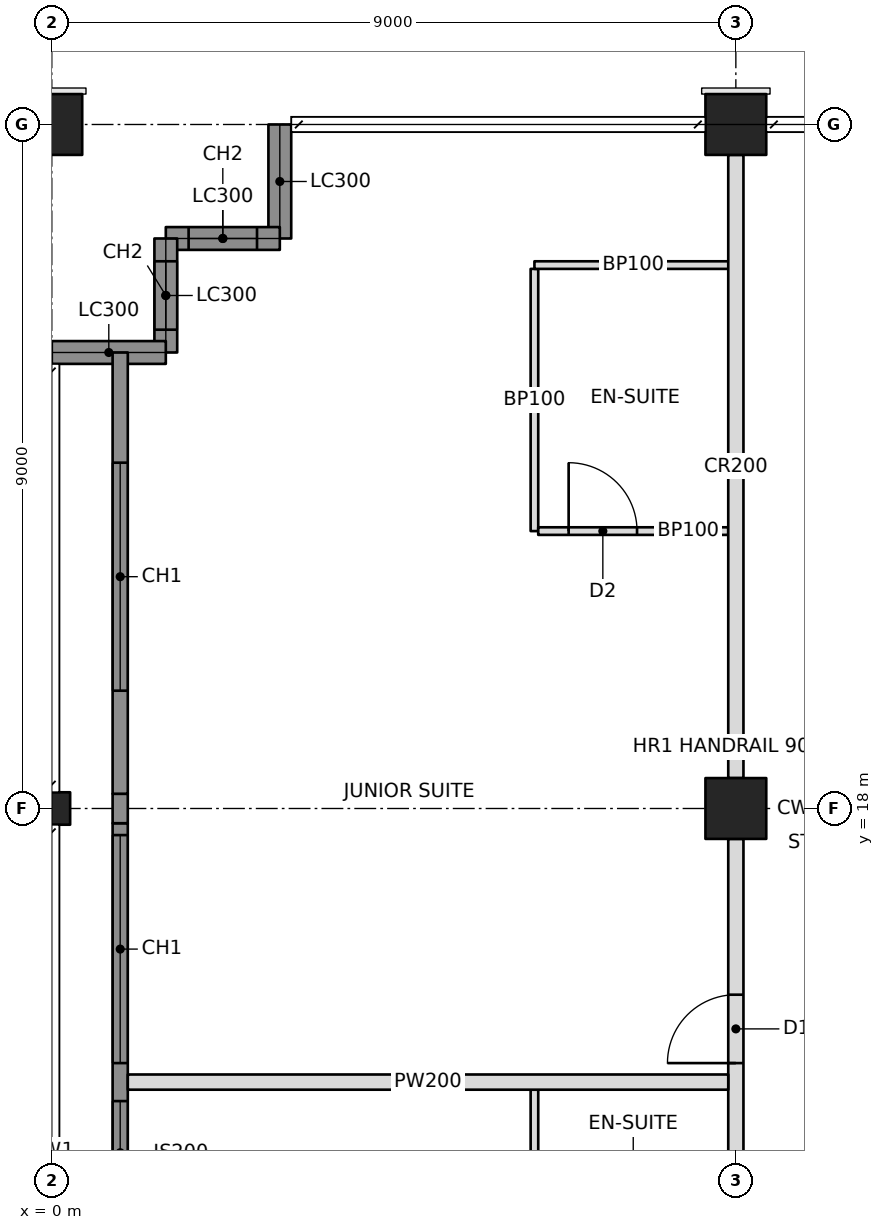
"""IFC4 building model, lengths in metres.
Left out: names, types, materials, properties, quantities, classifications, styles, units other than length and angle.
Written with IfcOpenShell. Run it as: python <this file> out.ifc"""

import sys

from ifc_helpers import new_model, si_unit, direction, frame, frame_2d, origin, origin_2d, place, context, subcontext, project, spatial, rectangle, hollow_rectangle, i_section, extrude, element, fill, save


model = new_model("IFC4")
c1 = context("Model", 3, precision=1e-05, world=origin(), true_north=direction((0.0, 1.0)))
c2 = subcontext(c1, "Body", "Model", "MODEL_VIEW")
j1 = project(units=[si_unit("LENGTHUNIT", "METRE"), si_unit("PLANEANGLEUNIT", "RADIAN")], contexts=[c1])
p1 = place(None, origin())
s1 = spatial("IfcSite", under=j1, at=p1, CompositionType="ELEMENT")
p2 = place(p1, origin())
s2 = spatial("IfcBuilding", under=s1, at=p2, CompositionType="ELEMENT")
p3 = place(p2, frame((0.0, 0.0, 208.0)))
s3 = spatial("IfcBuildingStorey", under=s2, at=p3, CompositionType="ELEMENT", Elevation=208.0)
p4 = place(p3, frame((0.0, 18.0, 0.0), z_axis=(0.0, 0.0, 1.0), x_axis=(0.0, 1.0, 0.0)))
e1 = element("IfcColumn", 1, at=p4, inside=s3, PredefinedType="COLUMN", context=c2, shape_type="SweptSolid", body=[
    extrude(i_section(OverallWidth=0.427, OverallDepth=0.483, WebThickness=0.051, FlangeThickness=0.082, at=origin_2d()), origin(), (0.0, 0.0, 1.0), 3.4),
])
p5 = place(p3, frame((0.0, 27.0, 0.0), z_axis=(0.0, 0.0, 1.0), x_axis=(0.0, 1.0, 0.0)))
e2 = element("IfcColumn", 2, at=p5, inside=s3, PredefinedType="COLUMN", context=c2, shape_type="SweptSolid", body=[
    extrude(hollow_rectangle(XDim=0.8, YDim=0.8, WallThickness=0.06, at=origin_2d()), origin(), (0.0, 0.0, 1.0), 3.4),
])
p6 = place(p3, frame((9.0, 18.0, 0.0), z_axis=(0.0, 0.0, 1.0), x_axis=(1.0, 0.0, 0.0)))
e3 = element("IfcColumn", 3, at=p6, inside=s3, PredefinedType="COLUMN", context=c2, shape_type="SweptSolid", body=[
    extrude(hollow_rectangle(XDim=0.8, YDim=0.8, WallThickness=0.05, at=origin_2d()), origin(), (0.0, 0.0, 1.0), 3.4),
])
p7 = place(p3, frame((9.0, 27.0, 0.0), z_axis=(0.0, 0.0, 1.0), x_axis=(1.0, 0.0, 0.0)))
e4 = element("IfcColumn", 4, at=p7, inside=s3, PredefinedType="COLUMN", context=c2, shape_type="SweptSolid", body=[
    extrude(hollow_rectangle(XDim=0.8, YDim=0.8, WallThickness=0.06, at=origin_2d()), origin(), (0.0, 0.0, 1.0), 3.4),
])
p8 = place(p3, frame((3.0, 27.0, 0.0), z_axis=(0.0, 0.0, 1.0), x_axis=(0.0, -1.0, 0.0)))
e5 = element("IfcWall", 5, at=p8, inside=s3, PredefinedType="SOLIDWALL", context=c2, shape_type="SweptSolid", body=[
    extrude(rectangle(XDim=1.5, YDim=0.3, at=frame_2d((0.75, 0.0))), origin(), (0.0, 0.0, 1.0), 2.42),
])
p9 = place(p3, frame((3.0, 25.5, 0.0), z_axis=(0.0, 0.0, 1.0), x_axis=(-1.0, 0.0, 0.0)))
e6 = element("IfcWall", 6, at=p9, inside=s3, PredefinedType="SOLIDWALL", context=c2, shape_type="SweptSolid", body=[
    extrude(rectangle(XDim=1.5, YDim=0.3, at=frame_2d((0.75, 0.0))), origin(), (0.0, 0.0, 1.0), 3.2),
])
p10 = place(p9, frame((0.3, 0.0, 0.6)))
e7 = element("IfcOpeningElement", 7, at=p10, cuts=e6, PredefinedType="OPENING", context=c2, shape_type="SweptSolid", body=[
    extrude(rectangle(XDim=0.9, YDim=2.2, at=frame_2d((0.45, 1.1))), frame((0.0, 0.16, 0.0), z_axis=(0.0, -1.0, 0.0), x_axis=(1.0, 0.0, 0.0)), (0.0, 0.0, 1.0), 0.32),
])
p11 = place(p3, frame((1.5, 25.5, 0.0), z_axis=(0.0, 0.0, 1.0), x_axis=(0.0, -1.0, 0.0)))
e8 = element("IfcWall", 8, at=p11, inside=s3, PredefinedType="SOLIDWALL", context=c2, shape_type="SweptSolid", body=[
    extrude(rectangle(XDim=1.5, YDim=0.3, at=frame_2d((0.75, 0.0))), origin(), (0.0, 0.0, 1.0), 3.2),
])
p12 = place(p11, frame((0.3, 0.0, 0.6)))
e9 = element("IfcOpeningElement", 9, at=p12, cuts=e8, PredefinedType="OPENING", context=c2, shape_type="SweptSolid", body=[
    extrude(rectangle(XDim=0.9, YDim=2.2, at=frame_2d((0.45, 1.1))), frame((0.0, 0.16, 0.0), z_axis=(0.0, -1.0, 0.0), x_axis=(1.0, 0.0, 0.0)), (0.0, 0.0, 1.0), 0.32),
])
p13 = place(p3, frame((1.5, 24.0, 0.0), z_axis=(0.0, 0.0, 1.0), x_axis=(-1.0, 0.0, 0.0)))
e10 = element("IfcWall", 10, at=p13, inside=s3, PredefinedType="SOLIDWALL", context=c2, shape_type="SweptSolid", body=[
    extrude(rectangle(XDim=1.5, YDim=0.3, at=frame_2d((0.75, 0.0))), origin(), (0.0, 0.0, 1.0), 2.42),
])
p14 = place(p3, frame((9.0, 10.8, 0.0), z_axis=(0.0, 0.0, 1.0), x_axis=(0.0, 1.0, 0.0)))
e11 = element("IfcWall", 11, at=p14, inside=s3, PredefinedType="PARTITIONING", context=c2, shape_type="SweptSolid", body=[
    extrude(rectangle(XDim=6.8, YDim=0.2, at=frame_2d((3.4, 0.0))), origin(), (0.0, 0.0, 1.0), 2.405),
])
p15 = place(p14, frame((0.25, 0.0, 0.0)))
e12 = element("IfcOpeningElement", 12, at=p15, cuts=e11, PredefinedType="OPENING", context=c2, shape_type="SweptSolid", body=[
    extrude(rectangle(XDim=0.9, YDim=2.1, at=frame_2d((0.45, 1.05))), frame((0.0, 0.11, 0.0), z_axis=(0.0, -1.0, 0.0), x_axis=(1.0, 0.0, 0.0)), (0.0, 0.0, 1.0), 0.22),
])
p16 = place(p14, frame((3.85, 0.0, 0.0)))
e13 = element("IfcOpeningElement", 13, at=p16, cuts=e11, PredefinedType="OPENING", context=c2, shape_type="SweptSolid", body=[
    extrude(rectangle(XDim=0.9, YDim=2.1, at=frame_2d((0.45, 1.05))), frame((0.0, 0.11, 0.0), z_axis=(0.0, -1.0, 0.0), x_axis=(1.0, 0.0, 0.0)), (0.0, 0.0, 1.0), 0.22),
])
p17 = place(p3, frame((9.0, 18.4, 0.0), z_axis=(0.0, 0.0, 1.0), x_axis=(0.0, 1.0, 0.0)))
e14 = element("IfcWall", 14, at=p17, inside=s3, PredefinedType="PARTITIONING", context=c2, shape_type="SweptSolid", body=[
    extrude(rectangle(XDim=8.2, YDim=0.2, at=frame_2d((4.1, 0.0))), origin(), (0.0, 0.0, 1.0), 2.405),
])
p18 = place(p3, frame((8.9, 14.4, 0.0), z_axis=(0.0, 0.0, 1.0), x_axis=(-1.0, 0.0, 0.0)))
e15 = element("IfcWall", 15, at=p18, inside=s3, PredefinedType="PARTITIONING", context=c2, shape_type="SweptSolid", body=[
    extrude(rectangle(XDim=7.9, YDim=0.2, at=frame_2d((3.95, 0.0))), origin(), (0.0, 0.0, 1.0), 2.404),
])
p19 = place(p3, frame((6.35, 12.25, 0.0), z_axis=(0.0, 0.0, 1.0), x_axis=(0.0, 1.0, 0.0)))
e16 = element("IfcWall", 16, at=p19, inside=s3, PredefinedType="PARTITIONING", context=c2, shape_type="SweptSolid", body=[
    extrude(rectangle(XDim=2.05, YDim=0.1, at=frame_2d((1.025, 0.0))), origin(), (0.0, 0.0, 1.0), 3.2),
])
p20 = place(p3, frame((6.35, 21.65, 0.0), z_axis=(0.0, 0.0, 1.0), x_axis=(0.0, 1.0, 0.0)))
e17 = element("IfcWall", 17, at=p20, inside=s3, PredefinedType="PARTITIONING", context=c2, shape_type="SweptSolid", body=[
    extrude(rectangle(XDim=3.45, YDim=0.1, at=frame_2d((1.725, 0.0))), origin(), (0.0, 0.0, 1.0), 3.2),
])
p21 = place(p3, frame((8.9, 21.65, 0.0), z_axis=(0.0, 0.0, 1.0), x_axis=(-1.0, 0.0, 0.0)))
e18 = element("IfcWall", 18, at=p21, inside=s3, PredefinedType="PARTITIONING", context=c2, shape_type="SweptSolid", body=[
    extrude(rectangle(XDim=2.5, YDim=0.1, at=frame_2d((1.25, 0.0))), origin(), (0.0, 0.0, 1.0), 2.404),
])
p22 = place(p21, frame((1.2, 0.0, 0.0)))
e19 = element("IfcOpeningElement", 19, at=p22, cuts=e18, PredefinedType="OPENING", context=c2, shape_type="SweptSolid", body=[
    extrude(rectangle(XDim=0.9, YDim=2.1, at=frame_2d((0.45, 1.05))), frame((0.0, 0.06, 0.0), z_axis=(0.0, -1.0, 0.0), x_axis=(1.0, 0.0, 0.0)), (0.0, 0.0, 1.0), 0.12),
])
p23 = place(p3, frame((6.35, 25.15, 0.0), z_axis=(0.0, 0.0, 1.0), x_axis=(1.0, 0.0, 0.0)))
e20 = element("IfcWall", 20, at=p23, inside=s3, PredefinedType="PARTITIONING", context=c2, shape_type="SweptSolid", body=[
    extrude(rectangle(XDim=2.6, YDim=0.1, at=frame_2d((1.3, 0.0))), origin(), (0.0, 0.0, 1.0), 2.404),
])
p24 = place(p3, frame((0.9, 9.135, 0.0), z_axis=(0.0, 0.0, 1.0), x_axis=(0.0, 1.0, 0.0)))
e21 = element("IfcWall", 21, at=p24, inside=s3, PredefinedType="SOLIDWALL", context=c2, shape_type="SweptSolid", body=[
    extrude(rectangle(XDim=8.671, YDim=0.2, at=frame_2d((4.335, 0.0))), origin(), (0.0, 0.0, 1.0), 3.2),
])
p25 = place(p24, frame((2.015, 0.0, 0.6)))
e22 = element("IfcOpeningElement", 22, at=p25, cuts=e21, PredefinedType="OPENING", context=c2, shape_type="SweptSolid", body=[
    extrude(rectangle(XDim=3.0, YDim=2.2, at=frame_2d((1.5, 1.1))), frame((0.0, 0.11, 0.0), z_axis=(0.0, -1.0, 0.0), x_axis=(1.0, 0.0, 0.0)), (0.0, 0.0, 1.0), 0.22),
])
p26 = place(p24, frame((5.515, 0.0, 0.6)))
e23 = element("IfcOpeningElement", 23, at=p26, cuts=e21, PredefinedType="OPENING", context=c2, shape_type="SweptSolid", body=[
    extrude(rectangle(XDim=3.0, YDim=2.2, at=frame_2d((1.5, 1.1))), frame((0.0, 0.11, 0.0), z_axis=(0.0, -1.0, 0.0), x_axis=(1.0, 0.0, 0.0)), (0.0, 0.0, 1.0), 0.22),
])
p27 = place(p3, frame((0.9, 17.806, 0.0), z_axis=(0.0, 0.0, 1.0), x_axis=(0.0, 1.0, 0.0)))
e24 = element("IfcWall", 24, at=p27, inside=s3, PredefinedType="SOLIDWALL", context=c2, shape_type="SweptSolid", body=[
    extrude(rectangle(XDim=0.388, YDim=0.2, at=frame_2d((0.194, 0.0))), origin(), (0.0, 0.0, 1.0), 2.404),
])
p28 = place(p3, frame((0.9, 18.194, 0.0), z_axis=(0.0, 0.0, 1.0), x_axis=(0.0, 1.0, 0.0)))
e25 = element("IfcWall", 25, at=p28, inside=s3, PredefinedType="SOLIDWALL", context=c2, shape_type="SweptSolid", body=[
    extrude(rectangle(XDim=5.806, YDim=0.2, at=frame_2d((2.903, 0.0))), origin(), (0.0, 0.0, 1.0), 3.2),
])
p29 = place(p28, frame((1.356, 0.0, 0.6)))
e26 = element("IfcOpeningElement", 26, at=p29, cuts=e25, PredefinedType="OPENING", context=c2, shape_type="SweptSolid", body=[
    extrude(rectangle(XDim=3.0, YDim=2.2, at=frame_2d((1.5, 1.1))), frame((0.0, 0.11, 0.0), z_axis=(0.0, -1.0, 0.0), x_axis=(1.0, 0.0, 0.0)), (0.0, 0.0, 1.0), 0.22),
])
p30 = place(p10, origin())
e27 = element("IfcWindow", 27, at=p30, inside=s3, PartitioningType="SINGLE_PANEL", PredefinedType="WINDOW", context=c2, shape_type="SweptSolid", body=[
    extrude(rectangle(XDim=0.9, YDim=2.2, at=frame_2d((0.45, 1.1))), frame((0.0, 0.03, 0.0), z_axis=(0.0, -1.0, 0.0), x_axis=(1.0, 0.0, 0.0)), (0.0, 0.0, 1.0), 0.06),
])
fill(e7, e27)
p31 = place(p12, origin())
e28 = element("IfcWindow", 28, at=p31, inside=s3, PartitioningType="SINGLE_PANEL", PredefinedType="WINDOW", context=c2, shape_type="SweptSolid", body=[
    extrude(rectangle(XDim=0.9, YDim=2.2, at=frame_2d((0.45, 1.1))), frame((0.0, 0.03, 0.0), z_axis=(0.0, -1.0, 0.0), x_axis=(1.0, 0.0, 0.0)), (0.0, 0.0, 1.0), 0.06),
])
fill(e9, e28)
p32 = place(p25, origin())
e29 = element("IfcWindow", 29, at=p32, inside=s3, PartitioningType="TRIPLE_PANEL_VERTICAL", PredefinedType="WINDOW", context=c2, shape_type="SweptSolid", body=[
    extrude(rectangle(XDim=3.0, YDim=2.2, at=frame_2d((1.5, 1.1))), frame((0.0, 0.03, 0.0), z_axis=(0.0, -1.0, 0.0), x_axis=(1.0, 0.0, 0.0)), (0.0, 0.0, 1.0), 0.06),
])
fill(e22, e29)
p33 = place(p26, origin())
e30 = element("IfcWindow", 30, at=p33, inside=s3, PartitioningType="TRIPLE_PANEL_VERTICAL", PredefinedType="WINDOW", context=c2, shape_type="SweptSolid", body=[
    extrude(rectangle(XDim=3.0, YDim=2.2, at=frame_2d((1.5, 1.1))), frame((0.0, 0.03, 0.0), z_axis=(0.0, -1.0, 0.0), x_axis=(1.0, 0.0, 0.0)), (0.0, 0.0, 1.0), 0.06),
])
fill(e23, e30)
p34 = place(p29, origin())
e31 = element("IfcWindow", 31, at=p34, inside=s3, PartitioningType="TRIPLE_PANEL_VERTICAL", PredefinedType="WINDOW", context=c2, shape_type="SweptSolid", body=[
    extrude(rectangle(XDim=3.0, YDim=2.2, at=frame_2d((1.5, 1.1))), frame((0.0, 0.03, 0.0), z_axis=(0.0, -1.0, 0.0), x_axis=(1.0, 0.0, 0.0)), (0.0, 0.0, 1.0), 0.06),
])
fill(e26, e31)
p35 = place(p22, frame((0.9, 0.0, 0.0), z_axis=(0.0, 0.0, 1.0), x_axis=(-1.0, 0.0, 0.0)))
e32 = element("IfcDoor", 32, at=p35, inside=s3, OperationType="SINGLE_SWING_LEFT", PredefinedType="DOOR", context=c2, shape_type="SweptSolid", body=[
    extrude(rectangle(XDim=0.9, YDim=2.1, at=frame_2d((0.45, 1.05))), frame((0.0, 0.025, 0.0), z_axis=(0.0, -1.0, 0.0), x_axis=(1.0, 0.0, 0.0)), (0.0, 0.0, 1.0), 0.05),
])
fill(e19, e32)
p36 = place(p16, origin())
e33 = element("IfcDoor", 33, at=p36, inside=s3, OperationType="SINGLE_SWING_LEFT", PredefinedType="DOOR", context=c2, shape_type="SweptSolid", body=[
    extrude(rectangle(XDim=0.9, YDim=2.1, at=frame_2d((0.45, 1.05))), frame((0.0, 0.025, 0.0), z_axis=(0.0, -1.0, 0.0), x_axis=(1.0, 0.0, 0.0)), (0.0, 0.0, 1.0), 0.05),
])
fill(e13, e33)
save(model, sys.argv[1])
